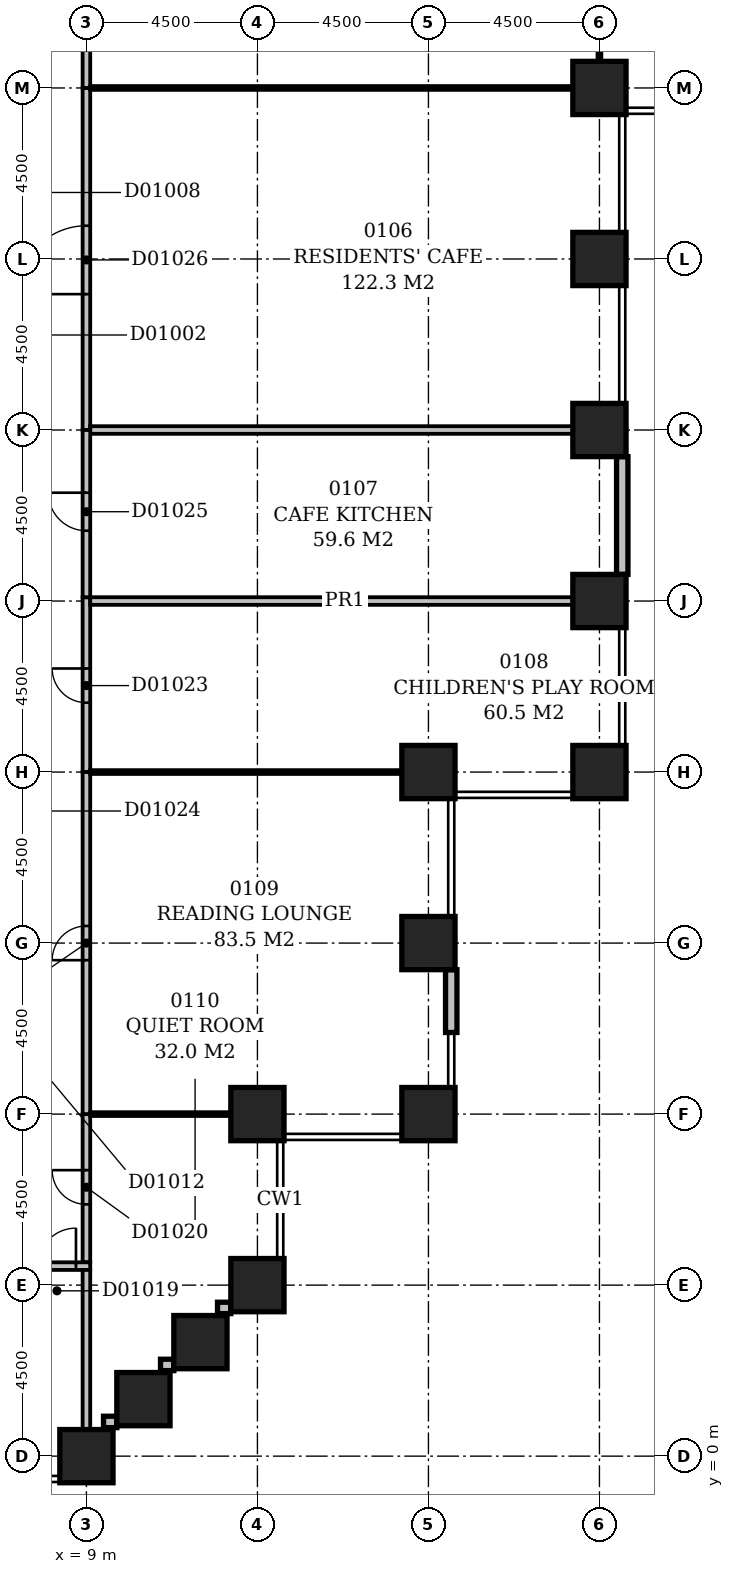
"""IFC4 building model, lengths in metres.
Left out: names, types, materials, properties, quantities, classifications, styles, units other than length and angle.
Written with IfcOpenShell. Run it as: python <this file> out.ifc"""

import sys

from ifc_helpers import new_model, si_unit, direction, frame, frame_2d, origin, origin_2d, place, context, subcontext, project, spatial, rectangle, extrude, element, fill, save


model = new_model("IFC4")
c1 = context("Model", 3, precision=1e-05, world=origin(), true_north=direction((0.0, 1.0)))
c2 = subcontext(c1, "Body", "Model", "MODEL_VIEW")
j1 = project(units=[si_unit("LENGTHUNIT", "METRE"), si_unit("PLANEANGLEUNIT", "RADIAN")], contexts=[c1])
p1 = place(None, origin())
s1 = spatial("IfcSite", under=j1, at=p1, CompositionType="ELEMENT")
p2 = place(p1, origin())
s2 = spatial("IfcBuilding", under=s1, at=p2, CompositionType="ELEMENT")
p3 = place(p2, frame((0.0, 0.0, 9.0)))
s3 = spatial("IfcBuildingStorey", under=s2, at=p3, CompositionType="ELEMENT", Elevation=9.0)
for number, where, z_axis, x_axis in (
    (1, (9.0, 0.0, -0.6), (0.0, 0.0, 1.0), (1.0, 0.0, 0.0)),
    (2, (10.5, 1.5, -0.6), (0.0, 0.0, 1.0), (1.0, 0.0, 0.0)),
    (3, (12.0, 3.0, -0.6), (0.0, 0.0, 1.0), (1.0, 0.0, 0.0)),
    (4, (13.5, 4.5, -0.6), (0.0, 0.0, 1.0), (1.0, 0.0, 0.0)),
    (5, (13.5, 9.0, -0.6), (0.0, 0.0, 1.0), (1.0, 0.0, 0.0)),
    (6, (18.0, 9.0, -0.6), (0.0, 0.0, 1.0), (1.0, 0.0, 0.0)),
    (7, (18.0, 13.5, -0.6), (0.0, 0.0, 1.0), (1.0, 0.0, 0.0)),
    (8, (18.0, 18.0, -0.6), (0.0, 0.0, 1.0), (1.0, 0.0, 0.0)),
    (9, (22.5, 18.0, -0.6), (0.0, 0.0, 1.0), (1.0, 0.0, 0.0)),
    (10, (22.5, 22.5, -0.6), (0.0, 0.0, 1.0), (1.0, 0.0, 0.0)),
    (11, (22.5, 27.0, -0.6), (0.0, 0.0, 1.0), (1.0, 0.0, 0.0)),
    (12, (22.5, 31.5, -0.6), (0.0, 0.0, 1.0), (1.0, 0.0, 0.0)),
    (13, (22.5, 36.0, -0.6), (0.0, 0.0, 1.0), (1.0, 0.0, 0.0)),
):
    element("IfcColumn", number, at=place(p3, frame(where, z_axis=z_axis, x_axis=x_axis)), inside=s3, PredefinedType="COLUMN", context=c2, shape_type="SweptSolid", body=[
        extrude(rectangle(XDim=1.4, YDim=1.4, at=origin_2d()), origin(), (0.0, 0.0, 1.0), 5.2),
    ])
for number, where, z_axis, x_axis in (
    (14, (9.45, 0.9, 0.0), (0.0, 0.0, 1.0), (1.0, 0.0, 0.0)),
    (15, (10.95, 2.4, 0.0), (0.0, 0.0, 1.0), (1.0, 0.0, 0.0)),
    (16, (12.45, 3.9, 0.0), (0.0, 0.0, 1.0), (1.0, 0.0, 0.0)),
):
    element("IfcWall", number, at=place(p3, frame(where, z_axis=z_axis, x_axis=x_axis)), inside=s3, PredefinedType="STANDARD", context=c2, shape_type="SweptSolid", body=[
        extrude(rectangle(XDim=0.35, YDim=0.3, at=frame_2d((0.175, 0.0))), origin(), (0.0, 0.0, 1.0), 3.9),
    ])
p4 = place(p3, frame((18.6, 11.148, 0.0), z_axis=(0.0, 0.0, 1.0), x_axis=(0.0, 1.0, 0.0)))
e17 = element("IfcWall", 17, at=p4, inside=s3, PredefinedType="STANDARD", context=c2, shape_type="SweptSolid", body=[
    extrude(rectangle(XDim=1.652, YDim=0.3, at=frame_2d((0.826, 0.0))), origin(), (0.0, 0.0, 1.0), 3.9),
])
p5 = place(p3, frame((23.1, 23.2, 0.0), z_axis=(0.0, 0.0, 1.0), x_axis=(0.0, 1.0, 0.0)))
e18 = element("IfcWall", 18, at=p5, inside=s3, PredefinedType="STANDARD", context=c2, shape_type="SweptSolid", body=[
    extrude(rectangle(XDim=3.1, YDim=0.3, at=frame_2d((1.55, 0.0))), origin(), (0.0, 0.0, 1.0), 3.9),
])
p6 = place(p3, frame((9.0, 0.0, 0.0), z_axis=(0.0, 0.0, 1.0), x_axis=(0.0, 1.0, 0.0)))
e19 = element("IfcWall", 19, at=p6, inside=s3, PredefinedType="PARTITIONING", context=c2, shape_type="SweptSolid", body=[
    extrude(rectangle(XDim=4.9, YDim=0.2, at=frame_2d((2.45, 0.0))), origin(), (0.0, 0.0, 1.0), 4.6),
])
p7 = place(p3, frame((7.35, 5.0, 0.0), z_axis=(0.0, 0.0, 1.0), x_axis=(1.0, 0.0, 0.0)))
e20 = element("IfcWall", 20, at=p7, inside=s3, PredefinedType="PARTITIONING", context=c2, shape_type="SweptSolid", body=[
    extrude(rectangle(XDim=1.75, YDim=0.2, at=frame_2d((0.875, 0.0))), origin(), (0.0, 0.0, 1.0), 4.6),
])
p8 = place(p7, frame((0.375, 0.0, 0.0)))
e21 = element("IfcOpeningElement", 21, at=p8, cuts=e20, PredefinedType="OPENING", context=c2, shape_type="SweptSolid", body=[
    extrude(rectangle(XDim=1.0, YDim=2.1, at=frame_2d((0.5, 1.05))), frame((0.0, 0.112, 0.0), z_axis=(0.0, -1.0, 0.0), x_axis=(1.0, 0.0, 0.0)), (0.0, 0.0, 1.0), 0.224),
])
p9 = place(p3, frame((9.0, 5.1, 0.0), z_axis=(0.0, 0.0, 1.0), x_axis=(0.0, 1.0, 0.0)))
e22 = element("IfcWall", 22, at=p9, inside=s3, PredefinedType="PARTITIONING", context=c2, shape_type="SweptSolid", body=[
    extrude(rectangle(XDim=3.9, YDim=0.2, at=frame_2d((1.95, 0.0))), origin(), (0.0, 0.0, 1.0), 4.6),
])
p10 = place(p9, frame((1.525, 0.0, 0.0)))
e23 = element("IfcOpeningElement", 23, at=p10, cuts=e22, PredefinedType="OPENING", context=c2, shape_type="SweptSolid", body=[
    extrude(rectangle(XDim=0.9, YDim=2.1, at=frame_2d((0.45, 1.05))), frame((0.0, 0.112, 0.0), z_axis=(0.0, -1.0, 0.0), x_axis=(1.0, 0.0, 0.0)), (0.0, 0.0, 1.0), 0.224),
])
p11 = place(p3, frame((9.0, 9.0, 0.0), z_axis=(0.0, 0.0, 1.0), x_axis=(0.0, 1.0, 0.0)))
e24 = element("IfcWall", 24, at=p11, inside=s3, PredefinedType="PARTITIONING", context=c2, shape_type="SweptSolid", body=[
    extrude(rectangle(XDim=9.0, YDim=0.2, at=frame_2d((4.5, 0.0))), origin(), (0.0, 0.0, 1.0), 4.6),
])
p12 = place(p11, frame((4.05, 0.0, 0.0)))
e25 = element("IfcOpeningElement", 25, at=p12, cuts=e24, PredefinedType="OPENING", context=c2, shape_type="SweptSolid", body=[
    extrude(rectangle(XDim=0.9, YDim=2.1, at=frame_2d((0.45, 1.05))), frame((0.0, 0.112, 0.0), z_axis=(0.0, -1.0, 0.0), x_axis=(1.0, 0.0, 0.0)), (0.0, 0.0, 1.0), 0.224),
])
p13 = place(p3, frame((13.5, 9.0, 0.0), z_axis=(0.0, 0.0, 1.0), x_axis=(-1.0, 0.0, 0.0)))
e26 = element("IfcWall", 26, at=p13, inside=s3, PredefinedType="PARTITIONING", context=c2, shape_type="SweptSolid", body=[
    extrude(rectangle(XDim=4.4, YDim=0.1, at=frame_2d((2.2, 0.0))), origin(), (0.0, 0.0, 1.0), 4.6),
])
p14 = place(p3, frame((14.2, 9.0, 0.0), z_axis=(0.0, 0.0, 1.0), x_axis=(-1.0, 0.0, 0.0)))
e27 = element("IfcWall", 27, at=p14, inside=s3, PredefinedType="PARTITIONING", context=c2, shape_type="SweptSolid", body=[
    extrude(rectangle(XDim=0.7, YDim=0.1, at=frame_2d((0.35, 0.0))), origin(), (0.0, 0.0, 1.0), 3.9),
])
p15 = place(p3, frame((9.0, 18.0, 0.0), z_axis=(0.0, 0.0, 1.0), x_axis=(0.0, 1.0, 0.0)))
e28 = element("IfcWall", 28, at=p15, inside=s3, PredefinedType="PARTITIONING", context=c2, shape_type="SweptSolid", body=[
    extrude(rectangle(XDim=4.6, YDim=0.2, at=frame_2d((2.3, 0.0))), origin(), (0.0, 0.0, 1.0), 4.6),
])
p16 = place(p15, frame((1.825, 0.0, 0.0)))
e29 = element("IfcOpeningElement", 29, at=p16, cuts=e28, PredefinedType="OPENING", context=c2, shape_type="SweptSolid", body=[
    extrude(rectangle(XDim=0.9, YDim=2.1, at=frame_2d((0.45, 1.05))), frame((0.0, 0.112, 0.0), z_axis=(0.0, -1.0, 0.0), x_axis=(1.0, 0.0, 0.0)), (0.0, 0.0, 1.0), 0.224),
])
p17 = place(p3, frame((18.0, 18.0, 0.0), z_axis=(0.0, 0.0, 1.0), x_axis=(-1.0, 0.0, 0.0)))
e30 = element("IfcWall", 30, at=p17, inside=s3, PredefinedType="PARTITIONING", context=c2, shape_type="SweptSolid", body=[
    extrude(rectangle(XDim=8.9, YDim=0.1, at=frame_2d((4.45, 0.0))), origin(), (0.0, 0.0, 1.0), 3.9),
])
p18 = place(p3, frame((18.7, 18.0, 0.0), z_axis=(0.0, 0.0, 1.0), x_axis=(-1.0, 0.0, 0.0)))
e31 = element("IfcWall", 31, at=p18, inside=s3, PredefinedType="PARTITIONING", context=c2, shape_type="SweptSolid", body=[
    extrude(rectangle(XDim=0.7, YDim=0.1, at=frame_2d((0.35, 0.0))), origin(), (0.0, 0.0, 1.0), 3.9),
])
p19 = place(p3, frame((9.0, 22.6, 0.0), z_axis=(0.0, 0.0, 1.0), x_axis=(0.0, 1.0, 0.0)))
e32 = element("IfcWall", 32, at=p19, inside=s3, PredefinedType="PARTITIONING", context=c2, shape_type="SweptSolid", body=[
    extrude(rectangle(XDim=4.4, YDim=0.2, at=frame_2d((2.2, 0.0))), origin(), (0.0, 0.0, 1.0), 4.6),
])
p20 = place(p19, frame((1.75, 0.0, 0.0)))
e33 = element("IfcOpeningElement", 33, at=p20, cuts=e32, PredefinedType="OPENING", context=c2, shape_type="SweptSolid", body=[
    extrude(rectangle(XDim=1.0, YDim=2.1, at=frame_2d((0.5, 1.05))), frame((0.0, 0.112, 0.0), z_axis=(0.0, -1.0, 0.0), x_axis=(1.0, 0.0, 0.0)), (0.0, 0.0, 1.0), 0.224),
])
p21 = place(p3, frame((22.5, 22.5, 0.0), z_axis=(0.0, 0.0, 1.0), x_axis=(-1.0, 0.0, 0.0)))
e34 = element("IfcWall", 34, at=p21, inside=s3, PredefinedType="PARTITIONING", context=c2, shape_type="SweptSolid", body=[
    extrude(rectangle(XDim=13.4, YDim=0.2, at=frame_2d((6.7, 0.0))), origin(), (0.0, 0.0, 1.0), 4.6),
])
p22 = place(p3, frame((9.0, 27.0, 0.0), z_axis=(0.0, 0.0, 1.0), x_axis=(0.0, 1.0, 0.0)))
e35 = element("IfcWall", 35, at=p22, inside=s3, PredefinedType="PARTITIONING", context=c2, shape_type="SweptSolid", body=[
    extrude(rectangle(XDim=9.0, YDim=0.2, at=frame_2d((4.5, 0.0))), origin(), (0.0, 0.0, 1.0), 4.6),
])
p23 = place(p22, frame((3.575, 0.0, 0.0)))
e36 = element("IfcOpeningElement", 36, at=p23, cuts=e35, PredefinedType="OPENING", context=c2, shape_type="SweptSolid", body=[
    extrude(rectangle(XDim=1.8, YDim=2.4, at=frame_2d((0.9, 1.2))), frame((0.0, 0.112, 0.0), z_axis=(0.0, -1.0, 0.0), x_axis=(1.0, 0.0, 0.0)), (0.0, 0.0, 1.0), 0.224),
])
p24 = place(p3, frame((22.5, 27.0, 0.0), z_axis=(0.0, 0.0, 1.0), x_axis=(-1.0, 0.0, 0.0)))
e37 = element("IfcWall", 37, at=p24, inside=s3, PredefinedType="PARTITIONING", context=c2, shape_type="SweptSolid", body=[
    extrude(rectangle(XDim=13.4, YDim=0.2, at=frame_2d((6.7, 0.0))), origin(), (0.0, 0.0, 1.0), 4.0),
])
p25 = place(p3, frame((22.5, 35.35, 0.0), z_axis=(0.0, 0.0, 1.0), x_axis=(0.0, 1.0, 0.0)))
e38 = element("IfcWall", 38, at=p25, inside=s3, PredefinedType="PARTITIONING", context=c2, shape_type="SweptSolid", body=[
    extrude(rectangle(XDim=0.6, YDim=0.1, at=frame_2d((0.3, 0.0))), origin(), (0.0, 0.0, 1.0), 3.9),
])
p26 = place(p3, frame((9.0, 36.0, 0.0), z_axis=(0.0, 0.0, 1.0), x_axis=(0.0, 1.0, 0.0)))
e39 = element("IfcWall", 39, at=p26, inside=s3, PredefinedType="PARTITIONING", context=c2, shape_type="SweptSolid", body=[
    extrude(rectangle(XDim=13.4, YDim=0.2, at=frame_2d((6.7, 0.0))), origin(), (0.0, 0.0, 1.0), 4.6),
])
p27 = place(p3, frame((22.45, 36.0, 0.0), z_axis=(0.0, 0.0, 1.0), x_axis=(-1.0, 0.0, 0.0)))
e40 = element("IfcWall", 40, at=p27, inside=s3, PredefinedType="PARTITIONING", context=c2, shape_type="SweptSolid", body=[
    extrude(rectangle(XDim=13.35, YDim=0.1, at=frame_2d((6.675, 0.0))), origin(), (0.0, 0.0, 1.0), 3.7),
])
p28 = place(p3, frame((22.5, 49.4, 0.0), z_axis=(0.0, 0.0, 1.0), x_axis=(0.0, -1.0, 0.0)))
e41 = element("IfcWall", 41, at=p28, inside=s3, PredefinedType="PARTITIONING", context=c2, shape_type="SweptSolid", body=[
    extrude(rectangle(XDim=13.45, YDim=0.1, at=frame_2d((6.725, 0.0))), origin(), (0.0, 0.0, 1.0), 4.6),
])
p29 = place(p8, frame((1.0, 0.0, 0.0), z_axis=(0.0, 0.0, 1.0), x_axis=(-1.0, 0.0, 0.0)))
e42 = element("IfcDoor", 42, at=p29, inside=s3, OperationType="SINGLE_SWING_LEFT", PredefinedType="DOOR", context=c2, shape_type="SweptSolid", body=[
    extrude(rectangle(XDim=1.0, YDim=2.1, at=frame_2d((0.5, 1.05))), frame((0.0, 0.025, 0.0), z_axis=(0.0, -1.0, 0.0), x_axis=(1.0, 0.0, 0.0)), (0.0, 0.0, 1.0), 0.05),
])
fill(e21, e42)
p30 = place(p10, frame((0.9, 0.0, 0.0), z_axis=(0.0, 0.0, 1.0), x_axis=(-1.0, 0.0, 0.0)))
e43 = element("IfcDoor", 43, at=p30, inside=s3, OperationType="SINGLE_SWING_LEFT", PredefinedType="DOOR", context=c2, shape_type="SweptSolid", body=[
    extrude(rectangle(XDim=0.9, YDim=2.1, at=frame_2d((0.45, 1.05))), frame((0.0, 0.025, 0.0), z_axis=(0.0, -1.0, 0.0), x_axis=(1.0, 0.0, 0.0)), (0.0, 0.0, 1.0), 0.05),
])
fill(e23, e43)
p31 = place(p12, origin())
e44 = element("IfcDoor", 44, at=p31, inside=s3, OperationType="SINGLE_SWING_LEFT", PredefinedType="DOOR", context=c2, shape_type="SweptSolid", body=[
    extrude(rectangle(XDim=0.9, YDim=2.1, at=frame_2d((0.45, 1.05))), frame((0.0, 0.025, 0.0), z_axis=(0.0, -1.0, 0.0), x_axis=(1.0, 0.0, 0.0)), (0.0, 0.0, 1.0), 0.05),
])
fill(e25, e44)
p32 = place(p16, frame((0.9, 0.0, 0.0), z_axis=(0.0, 0.0, 1.0), x_axis=(-1.0, 0.0, 0.0)))
e45 = element("IfcDoor", 45, at=p32, inside=s3, OperationType="SINGLE_SWING_LEFT", PredefinedType="DOOR", context=c2, shape_type="SweptSolid", body=[
    extrude(rectangle(XDim=0.9, YDim=2.1, at=frame_2d((0.45, 1.05))), frame((0.0, 0.025, 0.0), z_axis=(0.0, -1.0, 0.0), x_axis=(1.0, 0.0, 0.0)), (0.0, 0.0, 1.0), 0.05),
])
fill(e29, e45)
p33 = place(p20, frame((1.0, 0.0, 0.0), z_axis=(0.0, 0.0, 1.0), x_axis=(-1.0, 0.0, 0.0)))
e46 = element("IfcDoor", 46, at=p33, inside=s3, OperationType="SINGLE_SWING_LEFT", PredefinedType="DOOR", context=c2, shape_type="SweptSolid", body=[
    extrude(rectangle(XDim=1.0, YDim=2.1, at=frame_2d((0.5, 1.05))), frame((0.0, 0.025, 0.0), z_axis=(0.0, -1.0, 0.0), x_axis=(1.0, 0.0, 0.0)), (0.0, 0.0, 1.0), 0.05),
])
fill(e33, e46)
p34 = place(p23, origin())
e47 = element("IfcDoor", 47, at=p34, inside=s3, OperationType="DOUBLE_DOOR_SINGLE_SWING", PredefinedType="DOOR", context=c2, shape_type="SweptSolid", body=[
    extrude(rectangle(XDim=1.8, YDim=2.4, at=frame_2d((0.9, 1.2))), frame((0.0, 0.025, 0.0), z_axis=(0.0, -1.0, 0.0), x_axis=(1.0, 0.0, 0.0)), (0.0, 0.0, 1.0), 0.05),
])
fill(e36, e47)
save(model, sys.argv[1])
